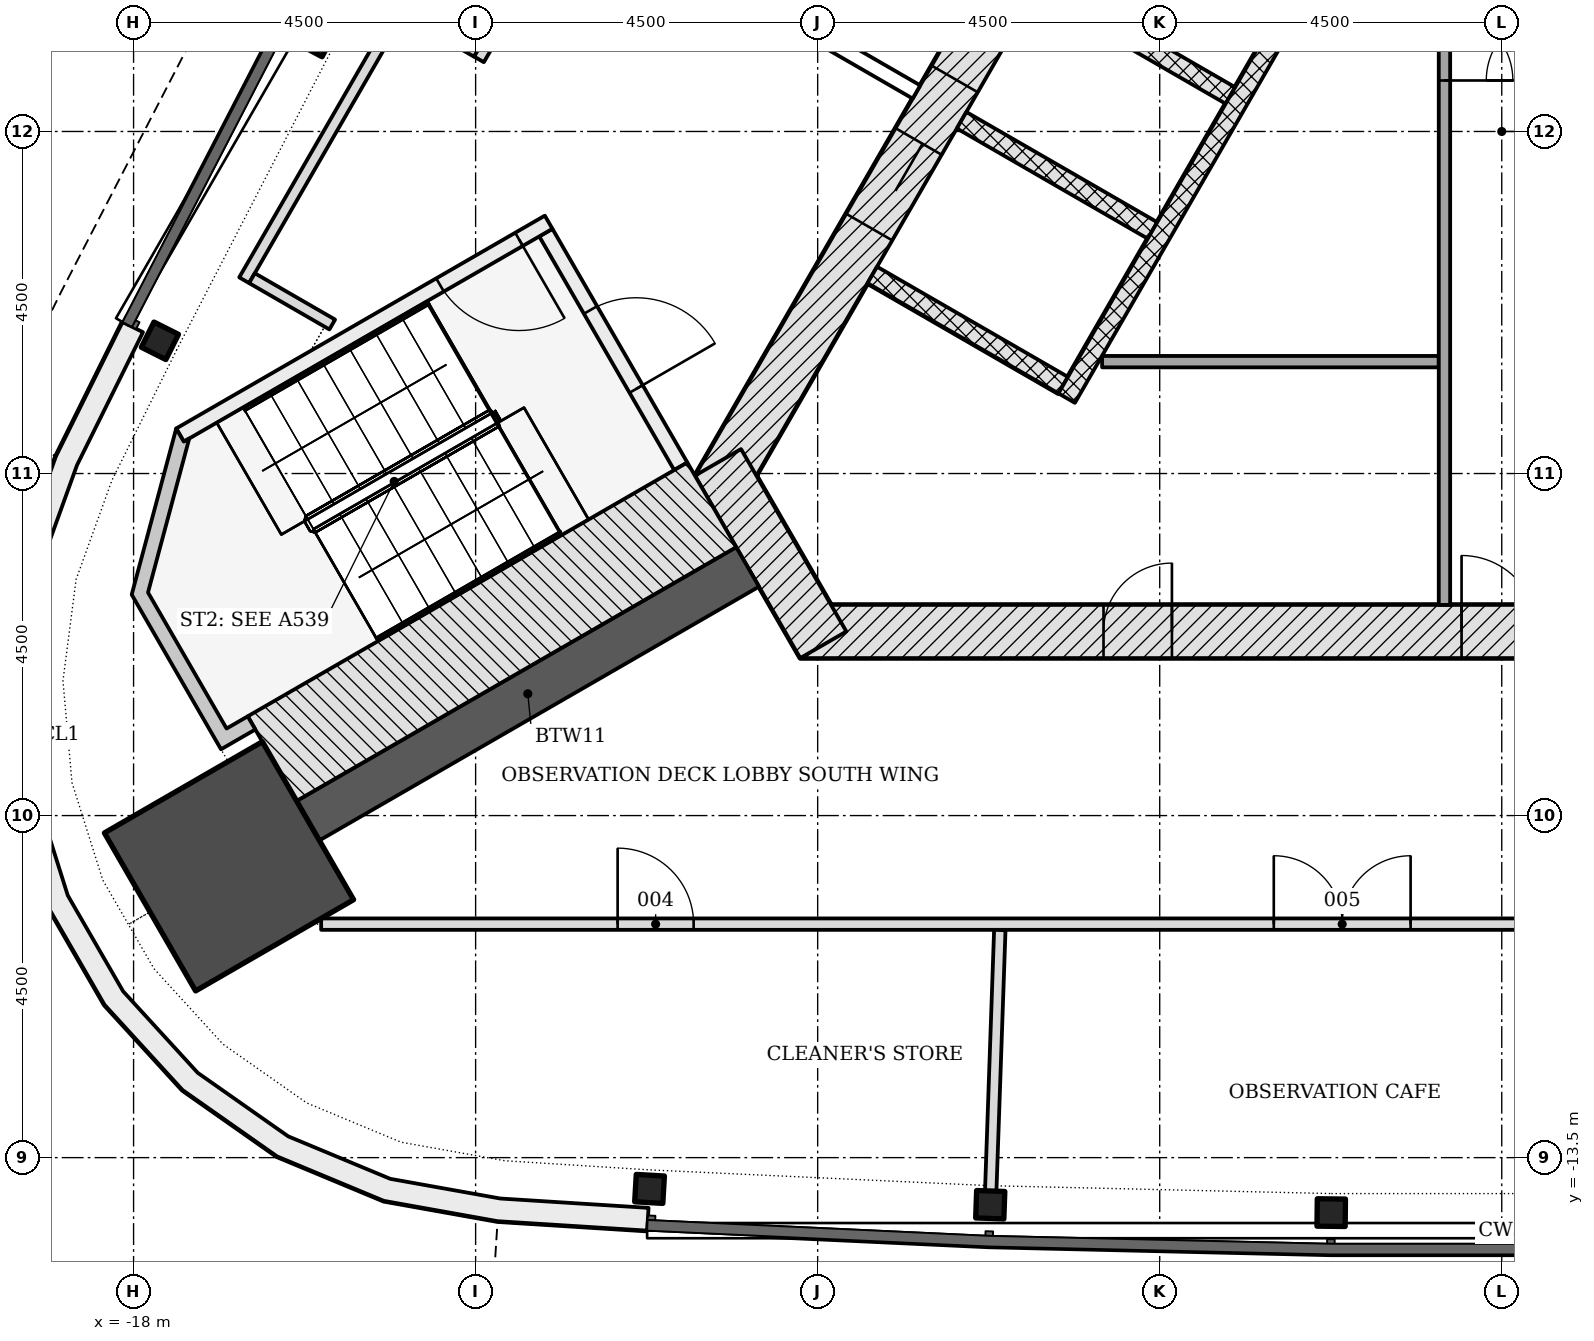
"""IFC4 building model, lengths in metres.
Left out: names, types, materials, properties, quantities, classifications, styles, units other than length and angle.
Written with IfcOpenShell. Run it as: python <this file> out.ifc"""

import sys

from ifc_helpers import new_model, si_unit, direction, frame, frame_2d, origin, origin_2d, place, context, subcontext, project, spatial, polyline, rectangle, i_section, outline, extrude, element, fill, save


model = new_model("IFC4")
c1 = context("Model", 3, precision=1e-05, world=origin(), true_north=direction((0.0, 1.0)))
c2 = subcontext(c1, "Body", "Model", "MODEL_VIEW")
j1 = project(units=[si_unit("LENGTHUNIT", "METRE"), si_unit("PLANEANGLEUNIT", "RADIAN")], contexts=[c1])
p1 = place(None, origin())
s1 = spatial("IfcSite", under=j1, at=p1, CompositionType="ELEMENT")
p2 = place(p1, origin())
s2 = spatial("IfcBuilding", under=s1, at=p2, CompositionType="ELEMENT")
p3 = place(p2, frame((0.0, 0.0, 274.2)))
s3 = spatial("IfcBuildingStorey", under=s2, at=p3, CompositionType="ELEMENT", Elevation=274.2)
p4 = place(p3, frame((-9.229, -6.578, -0.2), z_axis=(0.0, 0.0, 1.0), x_axis=(1.0, 0.0, 0.0)))
e1 = element("IfcWall", 1, at=p4, inside=s3, PredefinedType="SHEAR", context=c2, shape_type="SweptSolid", body=[
    extrude(rectangle(XDim=18.458, YDim=0.7, at=frame_2d((9.229, 0.0))), origin(), (0.0, 0.0, 1.0), 5.35),
])
p5 = place(p4, frame((8.7, 0.0, 0.2)))
e2 = element("IfcOpeningElement", 2, at=p5, cuts=e1, PredefinedType="OPENING", context=c2, shape_type="SweptSolid", body=[
    extrude(rectangle(XDim=1.0, YDim=2.1, at=frame_2d((0.5, 1.05))), frame((0.0, 0.36, 0.0), z_axis=(0.0, -1.0, 0.0), x_axis=(1.0, 0.0, 0.0)), (0.0, 0.0, 1.0), 0.72),
])
p6 = place(p4, frame((3.99, 0.0, 0.2)))
e3 = element("IfcOpeningElement", 3, at=p6, cuts=e1, PredefinedType="OPENING", context=c2, shape_type="SweptSolid", body=[
    extrude(rectangle(XDim=0.9, YDim=2.1, at=frame_2d((0.45, 1.05))), frame((0.0, 0.36, 0.0), z_axis=(0.0, -1.0, 0.0), x_axis=(1.0, 0.0, 0.0)), (0.0, 0.0, 1.0), 0.72),
])
p7 = place(p4, frame((13.539, 0.0, 0.2)))
e4 = element("IfcOpeningElement", 4, at=p7, cuts=e1, PredefinedType="OPENING", context=c2, shape_type="SweptSolid", body=[
    extrude(rectangle(XDim=0.9, YDim=2.1, at=frame_2d((0.45, 1.05))), frame((0.0, 0.36, 0.0), z_axis=(0.0, -1.0, 0.0), x_axis=(1.0, 0.0, 0.0)), (0.0, 0.0, 1.0), 0.72),
])
p8 = place(p3, frame((-1.083, 11.281, -0.2), z_axis=(0.0, 0.0, 1.0), x_axis=(-0.500001446645, -0.866024568562, 0.0)))
e5 = element("IfcWall", 5, at=p8, inside=s3, PredefinedType="SHEAR", context=c2, shape_type="SweptSolid", body=[
    extrude(rectangle(XDim=18.458, YDim=0.7, at=frame_2d((9.229, 0.0))), origin(), (0.0, 0.0, 1.0), 5.35),
])
p9 = place(p8, frame((8.979, 0.0, 0.2)))
e6 = element("IfcOpeningElement", 6, at=p9, cuts=e5, PredefinedType="OPENING", context=c2, shape_type="SweptSolid", body=[
    extrude(rectangle(XDim=1.2, YDim=2.1, at=frame_2d((0.6, 1.05))), frame((0.0, 0.36, 0.0), z_axis=(0.0, -1.0, 0.0), x_axis=(1.0, 0.0, 0.0)), (0.0, 0.0, 1.0), 0.72),
])
p10 = place(p8, frame((11.029, 0.0, 0.2)))
e7 = element("IfcOpeningElement", 7, at=p10, cuts=e5, PredefinedType="OPENING", context=c2, shape_type="SweptSolid", body=[
    extrude(rectangle(XDim=1.2, YDim=2.1, at=frame_2d((0.6, 1.05))), frame((0.0, 0.36, 0.0), z_axis=(0.0, -1.0, 0.0), x_axis=(1.0, 0.0, 0.0)), (0.0, 0.0, 1.0), 0.72),
])
p11 = place(p8, frame((13.179, 0.0, 0.2)))
e8 = element("IfcOpeningElement", 8, at=p11, cuts=e5, PredefinedType="OPENING", context=c2, shape_type="SweptSolid", body=[
    extrude(rectangle(XDim=1.3, YDim=2.1, at=frame_2d((0.65, 1.05))), frame((0.0, 0.36, 0.0), z_axis=(0.0, -1.0, 0.0), x_axis=(1.0, 0.0, 0.0)), (0.0, 0.0, 1.0), 0.72),
])
p12 = place(p3, frame((-10.311, -4.353, -0.2), z_axis=(0.0, 0.0, 1.0), x_axis=(0.500042739161, -0.866000726912, 0.0)))
e9 = element("IfcWall", 9, at=p12, inside=s3, PredefinedType="SHEAR", context=c2, shape_type="SweptSolid", body=[
    extrude(rectangle(XDim=2.771, YDim=0.7, at=frame_2d((1.386, 0.0))), origin(), (0.0, 0.0, 1.0), 5.35),
])
p13 = place(p3, frame((-9.922, -5.728, -0.2), z_axis=(0.0, 0.0, 1.0), x_axis=(-0.866032176823, -0.499988268569, 0.0)))
e10 = element("IfcWall", 10, at=p13, inside=s3, PredefinedType="SHEAR", context=c2, shape_type="SweptSolid", body=[
    extrude(rectangle(XDim=6.678, YDim=0.6, at=frame_2d((3.339, 0.0))), origin(), (0.0, 0.0, 1.0), 5.35),
])
p14 = place(p3, frame((-16.745, -9.667, -0.2), z_axis=(0.0, 0.0, 1.0), x_axis=(-0.866025403784, -0.5, 0.0)))
e11 = element("IfcColumn", 11, at=p14, inside=s3, PredefinedType="COLUMN", context=c2, shape_type="SweptSolid", body=[
    extrude(rectangle(XDim=2.4, YDim=2.4, at=origin_2d()), origin(), (0.0, 0.0, 1.0), 5.35),
])
for number, where, z_axis, x_axis in (
    (12, (-15.593, 1.232, -0.2), (0.0, 0.0, 1.0), (-0.47, -0.883, 0.0)),
    (13, (-17.654, -2.754, -0.2), (0.0, 0.0, 1.0), (-0.449, -0.894, 0.0)),
    (14, (-11.212, -13.911, -0.2), (0.0, 0.0, 1.0), (0.998, -0.058, 0.0)),
    (15, (-6.729, -14.119, -0.2), (0.0, 0.0, 1.0), (0.999, -0.035, 0.0)),
    (16, (-2.244, -14.224, -0.2), (0.0, 0.0, 1.0), (1.0, -0.012, 0.0)),
):
    element("IfcColumn", number, at=place(p3, frame(where, z_axis=z_axis, x_axis=x_axis)), inside=s3, PredefinedType="COLUMN", context=c2, shape_type="SweptSolid", body=[
        extrude(i_section(OverallWidth=0.371, OverallDepth=0.361, WebThickness=0.012, FlangeThickness=0.02, FilletRadius=0.015, at=origin_2d()), origin(), (0.0, 0.0, 1.0), 5.35),
    ])
p15 = place(p3, origin())
e17 = element("IfcWall", 17, at=p15, inside=s3, PredefinedType="NOTDEFINED", context=c2, shape_type="SweptSolid", body=[
    extrude(outline(polyline([(-18.145, -2.507), (-19.021, -4.273), (-19.538, -5.703), (-19.733, -7.21), (-19.599, -8.724), (-19.141, -10.174), (-18.381, -11.49), (-17.355, -12.611), (-16.111, -13.485), (-14.708, -14.069), (-13.211, -14.336), (-11.244, -14.46), (-11.225, -14.161), (-13.176, -14.038), (-14.623, -13.779), (-15.965, -13.22), (-17.156, -12.385), (-18.138, -11.312), (-18.865, -10.052), (-19.303, -8.665), (-19.432, -7.216), (-19.244, -5.774), (-18.745, -4.391), (-17.876, -2.64), (-18.145, -2.507)])), origin(), (0.0, 0.0, 1.0), 5.15),
])
for number, where, z_axis, x_axis in (
    (18, (-6.081, 1.923, -0.2), (0.0, 0.0, 1.0), (0.866, -0.5, 0.0)),
    (19, (-7.106, 0.148, -0.2), (0.0, 0.0, 1.0), (0.866, -0.5, 0.0)),
    (20, (-8.281, -1.887, -0.2), (0.0, 0.0, 1.0), (0.866, -0.5, 0.0)),
):
    element("IfcWall", number, at=place(p3, frame(where, z_axis=z_axis, x_axis=x_axis)), inside=s3, PredefinedType="PARTITIONING", context=c2, shape_type="SweptSolid", body=[
        extrude(rectangle(XDim=2.9, YDim=0.25, at=frame_2d((1.45, 0.0))), origin(), (0.0, 0.0, 1.0), 5.35),
    ])
p16 = place(p3, frame((-2.374, 2.294, 0.0), z_axis=(0.0, 0.0, 1.0), x_axis=(-0.500003174267, -0.866023571113, 0.0)))
e21 = element("IfcWall", 21, at=p16, inside=s3, PredefinedType="PARTITIONING", context=c2, shape_type="SweptSolid", body=[
    extrude(rectangle(XDim=6.7, YDim=0.25, at=frame_2d((3.35, 0.0))), origin(), (0.0, 0.0, 1.0), 5.15),
])
p17 = place(p3, frame((-5.258, -3.028, 0.0), z_axis=(0.0, 0.0, 1.0), x_axis=(1.0, 0.0, 0.0)))
e22 = element("IfcWall", 22, at=p17, inside=s3, PredefinedType="PARTITIONING", context=c2, shape_type="SweptSolid", body=[
    extrude(rectangle(XDim=4.429, YDim=0.15, at=frame_2d((2.215, 0.0))), origin(), (0.0, 0.0, 1.0), 5.15),
])
p18 = place(p3, frame((-0.754, 5.272, 0.0), z_axis=(0.0, 0.0, 1.0), x_axis=(0.0, -1.0, 0.0)))
e23 = element("IfcWall", 23, at=p18, inside=s3, PredefinedType="PARTITIONING", context=c2, shape_type="SweptSolid", body=[
    extrude(rectangle(XDim=11.5, YDim=0.15, at=frame_2d((5.75, 0.0))), origin(), (0.0, 0.0, 1.0), 5.15),
])
p19 = place(p18, frame((3.701, 0.0, 0.0)))
e24 = element("IfcOpeningElement", 24, at=p19, cuts=e23, PredefinedType="OPENING", context=c2, shape_type="SweptSolid", body=[
    extrude(rectangle(XDim=0.9, YDim=2.1, at=frame_2d((0.45, 1.05))), frame((0.0, 0.085, 0.0), z_axis=(0.0, -1.0, 0.0), x_axis=(1.0, 0.0, 0.0)), (0.0, 0.0, 1.0), 0.17),
])
p20 = place(p3, frame((-12.576, -1.331, -0.2), z_axis=(0.0, 0.0, 1.0), x_axis=(0.499970499736, -0.8660424351, 0.0)))
e25 = element("IfcWall", 25, at=p20, inside=s3, PredefinedType="SHEAR", context=c2, shape_type="SweptSolid", body=[
    extrude(rectangle(XDim=3.55, YDim=0.2, at=frame_2d((1.775, 0.0))), origin(), (0.0, 0.0, 1.0), 5.35),
])
p21 = place(p20, frame((1.175, 0.0, 0.2)))
e26 = element("IfcOpeningElement", 26, at=p21, cuts=e25, PredefinedType="OPENING", context=c2, shape_type="SweptSolid", body=[
    extrude(rectangle(XDim=1.2, YDim=2.1, at=frame_2d((0.6, 1.05))), frame((0.0, 0.11, 0.0), z_axis=(0.0, -1.0, 0.0), x_axis=(1.0, 0.0, 0.0)), (0.0, 0.0, 1.0), 0.22),
])
p22 = place(p3, frame((-12.539, -1.194, -0.2), z_axis=(0.0, 0.0, 1.0), x_axis=(-0.866045472092, -0.499965239061, 0.0)))
e27 = element("IfcWall", 27, at=p22, inside=s3, PredefinedType="SHEAR", context=c2, shape_type="SweptSolid", body=[
    extrude(rectangle(XDim=5.6, YDim=0.2, at=frame_2d((2.8, 0.0))), origin(), (0.0, 0.0, 1.0), 5.35),
])
p23 = place(p22, frame((0.45, 0.0, 0.2)))
e28 = element("IfcOpeningElement", 28, at=p23, cuts=e27, PredefinedType="OPENING", context=c2, shape_type="SweptSolid", body=[
    extrude(rectangle(XDim=1.2, YDim=2.1, at=frame_2d((0.6, 1.05))), frame((0.0, 0.11, 0.0), z_axis=(0.0, -1.0, 0.0), x_axis=(1.0, 0.0, 0.0)), (0.0, 0.0, 1.0), 0.22),
])
p24 = place(p3, frame((-10.393, -4.912, -0.2), z_axis=(0.0, 0.0, 1.0), x_axis=(-0.866025486527, -0.499999856685, 0.0)))
e29 = element("IfcWall", 29, at=p24, inside=s3, PredefinedType="SHEAR", context=c2, shape_type="SweptSolid", body=[
    extrude(rectangle(XDim=6.679, YDim=1.286, at=frame_2d((3.339, 0.0))), origin(), (0.0, 0.0, 1.0), 5.35),
])
p25 = place(p3, frame((0.0, 0.0, -0.2)))
e30 = element("IfcWall", 30, at=p25, inside=s3, PredefinedType="SHEAR", context=c2, shape_type="SweptSolid", body=[
    extrude(outline(polyline([(-17.439, -3.907), (-18.025, -6.093), (-16.85, -8.128), (-16.398, -7.867), (-16.498, -7.694), (-16.498, -7.694), (-16.777, -7.855), (-17.81, -6.065), (-17.267, -4.039), (-17.339, -4.081), (-17.339, -4.081), (-17.339, -4.081), (-17.339, -4.081), (-17.339, -4.081), (-17.339, -4.081), (-17.339, -4.081), (-17.339, -4.081), (-17.339, -4.081), (-17.339, -4.081), (-17.339, -4.081), (-17.339, -4.081), (-17.339, -4.081), (-17.339, -4.081), (-17.339, -4.081), (-17.339, -4.081), (-17.339, -4.081), (-17.439, -3.907)])), origin(), (0.0, 0.0, 1.0), 5.35),
])
p26 = place(p3, frame((-10.645, 2.219, 0.0), z_axis=(0.0, 0.0, 1.0), x_axis=(0.866038511948, -0.499977295307, 0.0)))
e31 = element("IfcWall", 31, at=p26, inside=s3, PredefinedType="PARTITIONING", context=c2, shape_type="SweptSolid", body=[
    extrude(rectangle(XDim=3.4, YDim=0.2, at=frame_2d((1.7, 0.0))), origin(), (0.0, 0.0, 1.0), 5.15),
])
p27 = place(p3, frame((-13.457, 0.949, 0.0), z_axis=(0.0, 0.0, 1.0), x_axis=(0.500001340499, 0.866024629845, 0.0)))
e32 = element("IfcWall", 32, at=p27, inside=s3, PredefinedType="PARTITIONING", context=c2, shape_type="SweptSolid", body=[
    extrude(rectangle(XDim=22.632, YDim=0.15, at=frame_2d((11.316, 0.0))), origin(), (0.0, 0.0, 1.0), 4.602),
])
p28 = place(p27, frame((14.943, 0.0, 0.0)))
e33 = element("IfcOpeningElement", 33, at=p28, cuts=e32, PredefinedType="OPENING", context=c2, shape_type="SweptSolid", body=[
    extrude(rectangle(XDim=1.0, YDim=2.1, at=frame_2d((0.5, 1.05))), frame((0.0, 0.085, 0.0), z_axis=(0.0, -1.0, 0.0), x_axis=(1.0, 0.0, 0.0)), (0.0, 0.0, 1.0), 0.17),
])
p29 = place(p27, frame((0.329, 0.0, 0.0)))
e34 = element("IfcOpeningElement", 34, at=p29, cuts=e32, PredefinedType="OPENING", context=c2, shape_type="SweptSolid", body=[
    extrude(rectangle(XDim=1.0, YDim=2.1, at=frame_2d((0.5, 1.05))), frame((0.0, 0.085, 0.0), z_axis=(0.0, -1.0, 0.0), x_axis=(1.0, 0.0, 0.0)), (0.0, 0.0, 1.0), 0.17),
])
p30 = place(p3, frame((-13.485, 1.05, 0.0), z_axis=(0.0, 0.0, 1.0), x_axis=(-0.865995866851, 0.50005115598, 0.0)))
e35 = element("IfcWall", 35, at=p30, inside=s3, PredefinedType="PARTITIONING", context=c2, shape_type="SweptSolid", body=[
    extrude(rectangle(XDim=1.221, YDim=0.15, at=frame_2d((0.611, 0.0))), origin(), (0.0, 0.0, 1.0), 5.15),
])
p31 = place(p3, frame((-14.516, 1.558, 0.0), z_axis=(0.0, 0.0, 1.0), x_axis=(-0.499994954979, -0.866028316509, 0.0)))
e36 = element("IfcWall", 36, at=p31, inside=s3, PredefinedType="PARTITIONING", context=c2, shape_type="SweptSolid", body=[
    extrude(rectangle(XDim=4.059, YDim=0.15, at=frame_2d((2.029, 0.0))), origin(), (0.0, 0.0, 1.0), 4.602),
])
p32 = place(p3, frame((-16.443, -1.93, 0.0), z_axis=(0.0, 0.0, 1.0), x_axis=(0.866042269935, -0.499970785833, 0.0)))
e37 = element("IfcWall", 37, at=p32, inside=s3, PredefinedType="PARTITIONING", context=c2, shape_type="SweptSolid", body=[
    extrude(rectangle(XDim=1.22, YDim=0.15, at=frame_2d((0.61, 0.0))), origin(), (0.0, 0.0, 1.0), 5.15),
])
p33 = place(p3, frame((-15.532, -10.428, 0.0), z_axis=(0.0, 0.0, 1.0), x_axis=(1.0, 0.0, 0.0)))
e38 = element("IfcWall", 38, at=p33, inside=s3, PredefinedType="PARTITIONING", context=c2, shape_type="SweptSolid", body=[
    extrude(rectangle(XDim=21.439, YDim=0.15, at=frame_2d((10.719, 0.0))), origin(), (0.0, 0.0, 1.0), 4.602),
])
p34 = place(p33, frame((3.901, 0.0, 0.0)))
e39 = element("IfcOpeningElement", 39, at=p34, cuts=e38, PredefinedType="OPENING", context=c2, shape_type="SweptSolid", body=[
    extrude(rectangle(XDim=1.0, YDim=2.1, at=frame_2d((0.5, 1.05))), frame((0.0, 0.085, 0.0), z_axis=(0.0, -1.0, 0.0), x_axis=(1.0, 0.0, 0.0)), (0.0, 0.0, 1.0), 0.17),
])
p35 = place(p33, frame((12.533, 0.0, 0.0)))
e40 = element("IfcOpeningElement", 40, at=p35, cuts=e38, PredefinedType="OPENING", context=c2, shape_type="SweptSolid", body=[
    extrude(rectangle(XDim=1.8, YDim=2.1, at=frame_2d((0.9, 1.05))), frame((0.0, 0.085, 0.0), z_axis=(0.0, -1.0, 0.0), x_axis=(1.0, 0.0, 0.0)), (0.0, 0.0, 1.0), 0.17),
])
p36 = place(p3, frame((-6.723, -13.945, 0.0), z_axis=(0.0, 0.0, 1.0), x_axis=(0.034767749757, 0.999395419029, 0.0)))
e41 = element("IfcWall", 41, at=p36, inside=s3, PredefinedType="PARTITIONING", context=c2, shape_type="SweptSolid", body=[
    extrude(rectangle(XDim=3.441, YDim=0.15, at=frame_2d((1.72, 0.0))), origin(), (0.0, 0.0, 1.0), 4.602),
])
p37 = place(p10, origin())
e42 = element("IfcDoor", 42, at=p37, inside=s3, OperationType="DOUBLE_DOOR_SLIDING", PredefinedType="DOOR", context=c2, shape_type="SweptSolid", body=[
    extrude(rectangle(XDim=1.2, YDim=2.1, at=frame_2d((0.6, 1.05))), frame((0.0, 0.025, 0.0), z_axis=(0.0, -1.0, 0.0), x_axis=(1.0, 0.0, 0.0)), (0.0, 0.0, 1.0), 0.05),
])
fill(e7, e42)
p38 = place(p11, origin())
e43 = element("IfcDoor", 43, at=p38, inside=s3, OperationType="DOUBLE_DOOR_SLIDING", PredefinedType="DOOR", context=c2, shape_type="SweptSolid", body=[
    extrude(rectangle(XDim=1.3, YDim=2.1, at=frame_2d((0.65, 1.05))), frame((0.0, 0.025, 0.0), z_axis=(0.0, -1.0, 0.0), x_axis=(1.0, 0.0, 0.0)), (0.0, 0.0, 1.0), 0.05),
])
fill(e8, e43)
p39 = place(p5, origin())
e44 = element("IfcDoor", 44, at=p39, inside=s3, OperationType="SINGLE_SWING_LEFT", PredefinedType="DOOR", context=c2, shape_type="SweptSolid", body=[
    extrude(rectangle(XDim=1.0, YDim=2.1, at=frame_2d((0.5, 1.05))), frame((0.0, 0.075, 0.0), z_axis=(0.0, -1.0, 0.0), x_axis=(1.0, 0.0, 0.0)), (0.0, 0.0, 1.0), 0.15),
])
fill(e2, e44)
p40 = place(p6, origin())
e45 = element("IfcDoor", 45, at=p40, inside=s3, OperationType="SINGLE_SWING_RIGHT", PredefinedType="DOOR", context=c2, shape_type="SweptSolid", body=[
    extrude(rectangle(XDim=0.9, YDim=2.1, at=frame_2d((0.45, 1.05))), frame((0.0, 0.075, 0.0), z_axis=(0.0, -1.0, 0.0), x_axis=(1.0, 0.0, 0.0)), (0.0, 0.0, 1.0), 0.15),
])
fill(e3, e45)
p41 = place(p19, origin())
e46 = element("IfcDoor", 46, at=p41, inside=s3, OperationType="SINGLE_SWING_RIGHT", PredefinedType="DOOR", context=c2, shape_type="SweptSolid", body=[
    extrude(rectangle(XDim=0.9, YDim=2.1, at=frame_2d((0.45, 1.05))), frame((0.0, 0.025, 0.0), z_axis=(0.0, -1.0, 0.0), x_axis=(1.0, 0.0, 0.0)), (0.0, 0.0, 1.0), 0.05),
])
fill(e24, e46)
p42 = place(p21, origin())
e47 = element("IfcDoor", 47, at=p42, inside=s3, OperationType="SINGLE_SWING_RIGHT", PredefinedType="DOOR", context=c2, shape_type="SweptSolid", body=[
    extrude(rectangle(XDim=1.2, YDim=2.1, at=frame_2d((0.6, 1.05))), frame((0.0, 0.025, 0.0), z_axis=(0.0, -1.0, 0.0), x_axis=(1.0, 0.0, 0.0)), (0.0, 0.0, 1.0), 0.05),
])
fill(e26, e47)
p43 = place(p23, origin())
e48 = element("IfcDoor", 48, at=p43, inside=s3, OperationType="SINGLE_SWING_LEFT", PredefinedType="DOOR", context=c2, shape_type="SweptSolid", body=[
    extrude(rectangle(XDim=1.2, YDim=2.1, at=frame_2d((0.6, 1.05))), frame((0.0, 0.025, 0.0), z_axis=(0.0, -1.0, 0.0), x_axis=(1.0, 0.0, 0.0)), (0.0, 0.0, 1.0), 0.05),
])
fill(e28, e48)
p44 = place(p34, origin())
e49 = element("IfcDoor", 49, at=p44, inside=s3, OperationType="SINGLE_SWING_LEFT", PredefinedType="DOOR", context=c2, shape_type="SweptSolid", body=[
    extrude(rectangle(XDim=1.0, YDim=2.1, at=frame_2d((0.5, 1.05))), frame((0.0, 0.025, 0.0), z_axis=(0.0, -1.0, 0.0), x_axis=(1.0, 0.0, 0.0)), (0.0, 0.0, 1.0), 0.05),
])
fill(e39, e49)
p45 = place(p35, origin())
e50 = element("IfcDoor", 50, at=p45, inside=s3, OperationType="DOUBLE_DOOR_SINGLE_SWING", PredefinedType="DOOR", context=c2, shape_type="SweptSolid", body=[
    extrude(rectangle(XDim=1.8, YDim=2.1, at=frame_2d((0.9, 1.05))), frame((0.0, 0.025, 0.0), z_axis=(0.0, -1.0, 0.0), x_axis=(1.0, 0.0, 0.0)), (0.0, 0.0, 1.0), 0.05),
])
fill(e40, e50)
save(model, sys.argv[1])
